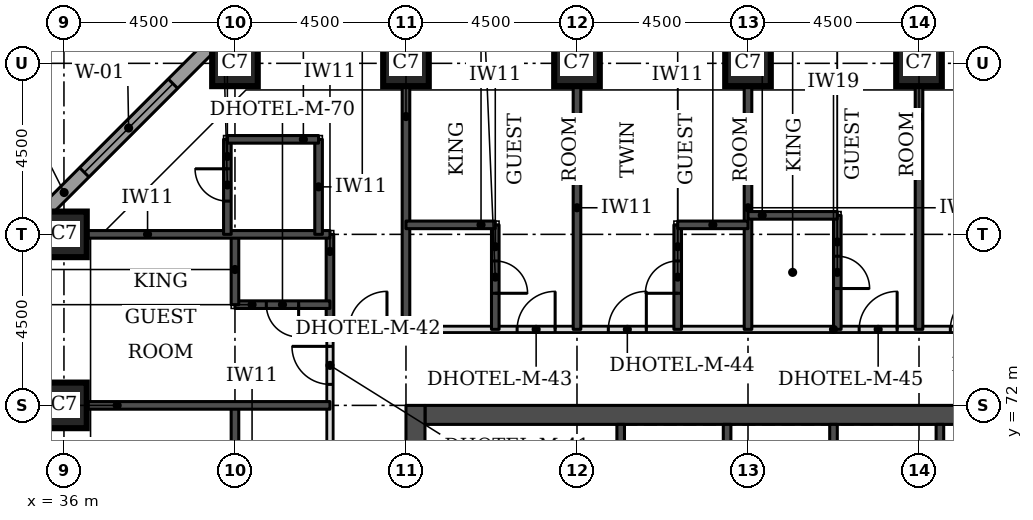
"""IFC4 building model, lengths in metres.
Left out: names, types, materials, properties, quantities, classifications, styles, units other than length and angle.
Written with IfcOpenShell. Run it as: python <this file> out.ifc"""

import sys

from ifc_helpers import new_model, si_unit, direction, frame, frame_2d, origin, origin_2d, place, context, subcontext, project, spatial, rectangle, extrude, element, fill, save


model = new_model("IFC4")
c1 = context("Model", 3, precision=1e-05, world=origin(), true_north=direction((0.0, 1.0)))
c2 = subcontext(c1, "Body", "Model", "MODEL_VIEW")
j1 = project(units=[si_unit("LENGTHUNIT", "METRE"), si_unit("PLANEANGLEUNIT", "RADIAN")], contexts=[c1])
p1 = place(None, origin())
s1 = spatial("IfcSite", under=j1, at=p1, CompositionType="ELEMENT")
p2 = place(p1, origin())
s2 = spatial("IfcBuilding", under=s1, at=p2, CompositionType="ELEMENT")
p3 = place(p2, frame((0.0, 0.0, 23.1)))
s3 = spatial("IfcBuildingStorey", under=s2, at=p3, CompositionType="ELEMENT", Elevation=23.1)
for number, where, z_axis, x_axis in (
    (1, (36.0, 72.0, 0.0), (0.0, 0.0, 1.0), (1.0, 0.0, 0.0)),
    (2, (36.0, 76.5, 0.0), (0.0, 0.0, 1.0), (1.0, 0.0, 0.0)),
    (3, (40.5, 81.0, 0.0), (0.0, 0.0, 1.0), (1.0, 0.0, 0.0)),
    (4, (45.0, 81.0, 0.0), (0.0, 0.0, 1.0), (1.0, 0.0, 0.0)),
    (5, (49.5, 81.0, 0.0), (0.0, 0.0, 1.0), (1.0, 0.0, 0.0)),
    (6, (54.0, 81.0, 0.0), (0.0, 0.0, 1.0), (1.0, 0.0, 0.0)),
    (7, (58.5, 81.0, 0.0), (0.0, 0.0, 1.0), (1.0, 0.0, 0.0)),
):
    element("IfcColumn", number, at=place(p3, frame(where, z_axis=z_axis, x_axis=x_axis)), inside=s3, PredefinedType="COLUMN", context=c2, shape_type="SweptSolid", body=[
        extrude(rectangle(XDim=1.2, YDim=1.2, at=origin_2d()), origin(), (0.0, 0.0, 1.0), 3.3),
    ])
p4 = place(p3, frame((45.5, 71.75, 0.0), z_axis=(0.0, 0.0, 1.0), x_axis=(1.0, 0.0, 0.0)))
e8 = element("IfcWall", 8, at=p4, inside=s3, PredefinedType="SHEAR", context=c2, shape_type="SweptSolid", body=[
    extrude(rectangle(XDim=21.5, YDim=0.5, at=frame_2d((10.75, 0.0))), origin(), (0.0, 0.0, 1.0), 3.3),
])
p5 = place(p3, frame((45.25, 49.5, 0.0), z_axis=(0.0, 0.0, 1.0), x_axis=(0.0, 1.0, 0.0)))
e9 = element("IfcWall", 9, at=p5, inside=s3, PredefinedType="SHEAR", context=c2, shape_type="SweptSolid", body=[
    extrude(rectangle(XDim=22.5, YDim=0.5, at=frame_2d((11.25, 0.0))), origin(), (0.0, 0.0, 1.0), 3.3),
])
p6 = place(p5, frame((4.2, 0.0, 0.0)))
e10 = element("IfcOpeningElement", 10, at=p6, cuts=e9, PredefinedType="OPENING", context=c2, shape_type="SweptSolid", body=[
    extrude(rectangle(XDim=1.8, YDim=2.1, at=frame_2d((0.9, 1.05))), frame((0.0, 0.26, 0.0), z_axis=(0.0, -1.0, 0.0), x_axis=(1.0, 0.0, 0.0)), (0.0, 0.0, 1.0), 0.52),
])
p7 = place(p5, frame((6.9, 0.0, 0.0)))
e11 = element("IfcOpeningElement", 11, at=p7, cuts=e9, PredefinedType="OPENING", context=c2, shape_type="SweptSolid", body=[
    extrude(rectangle(XDim=1.1, YDim=2.1, at=frame_2d((0.55, 1.05))), frame((0.0, 0.26, 0.0), z_axis=(0.0, -1.0, 0.0), x_axis=(1.0, 0.0, 0.0)), (0.0, 0.0, 1.0), 0.52),
])
p8 = place(p5, frame((13.6, 0.0, 0.0)))
e12 = element("IfcOpeningElement", 12, at=p8, cuts=e9, PredefinedType="OPENING", context=c2, shape_type="SweptSolid", body=[
    extrude(rectangle(XDim=1.1, YDim=2.1, at=frame_2d((0.55, 1.05))), frame((0.0, 0.26, 0.0), z_axis=(0.0, -1.0, 0.0), x_axis=(1.0, 0.0, 0.0)), (0.0, 0.0, 1.0), 0.52),
])
p9 = place(p5, frame((16.5, 0.0, 0.0)))
e13 = element("IfcOpeningElement", 13, at=p9, cuts=e9, PredefinedType="OPENING", context=c2, shape_type="SweptSolid", body=[
    extrude(rectangle(XDim=1.8, YDim=2.1, at=frame_2d((0.9, 1.05))), frame((0.0, 0.26, 0.0), z_axis=(0.0, -1.0, 0.0), x_axis=(1.0, 0.0, 0.0)), (0.0, 0.0, 1.0), 0.52),
])
p10 = place(p3, frame((40.23, 81.826, 0.0), z_axis=(0.0, 0.0, 1.0), x_axis=(-0.707106781187, -0.707106781187, 0.0)))
e14 = element("IfcWall", 14, at=p10, inside=s3, PredefinedType="STANDARD", context=c2, shape_type="SweptSolid", body=[
    extrude(rectangle(XDim=7.151, YDim=0.35, at=frame_2d((3.576, 0.0))), origin(), (0.0, 0.0, 1.0), 3.055),
])
p11 = place(p10, frame((1.926, 0.0, 0.8)))
e15 = element("IfcOpeningElement", 15, at=p11, cuts=e14, PredefinedType="OPENING", context=c2, shape_type="SweptSolid", body=[
    extrude(rectangle(XDim=3.3, YDim=1.5, at=frame_2d((1.65, 0.75))), frame((0.0, 0.185, 0.0), z_axis=(0.0, -1.0, 0.0), x_axis=(1.0, 0.0, 0.0)), (0.0, 0.0, 1.0), 0.37),
])
p12 = place(p3, frame((43.0, 56.6, 0.0), z_axis=(0.0, 0.0, 1.0), x_axis=(0.0, 1.0, 0.0)))
e16 = element("IfcWall", 16, at=p12, inside=s3, PredefinedType="PARTITIONING", context=c2, shape_type="SweptSolid", body=[
    extrude(rectangle(XDim=17.4, YDim=0.15, at=frame_2d((8.7, 0.0))), origin(), (0.0, 0.0, 1.0), 3.08),
])
p13 = place(p12, frame((9.075, 0.0, 0.0)))
e17 = element("IfcOpeningElement", 17, at=p13, cuts=e16, PredefinedType="OPENING", context=c2, shape_type="SweptSolid", body=[
    extrude(rectangle(XDim=1.0, YDim=2.1, at=frame_2d((0.5, 1.05))), frame((0.0, 0.085, 0.0), z_axis=(0.0, -1.0, 0.0), x_axis=(1.0, 0.0, 0.0)), (0.0, 0.0, 1.0), 0.17),
])
p14 = place(p12, frame((11.475, 0.0, 0.0)))
e18 = element("IfcOpeningElement", 18, at=p14, cuts=e16, PredefinedType="OPENING", context=c2, shape_type="SweptSolid", body=[
    extrude(rectangle(XDim=1.0, YDim=2.1, at=frame_2d((0.5, 1.05))), frame((0.0, 0.085, 0.0), z_axis=(0.0, -1.0, 0.0), x_axis=(1.0, 0.0, 0.0)), (0.0, 0.0, 1.0), 0.17),
])
p15 = place(p12, frame((15.953, 0.0, 0.0)))
e19 = element("IfcOpeningElement", 19, at=p15, cuts=e16, PredefinedType="OPENING", context=c2, shape_type="SweptSolid", body=[
    extrude(rectangle(XDim=1.0, YDim=2.1, at=frame_2d((0.5, 1.05))), frame((0.0, 0.085, 0.0), z_axis=(0.0, -1.0, 0.0), x_axis=(1.0, 0.0, 0.0)), (0.0, 0.0, 1.0), 0.17),
])
p16 = place(p3, frame((43.0, 74.0, 0.0), z_axis=(0.0, 0.0, 1.0), x_axis=(1.0, 0.0, 0.0)))
e20 = element("IfcWall", 20, at=p16, inside=s3, PredefinedType="PARTITIONING", context=c2, shape_type="SweptSolid", body=[
    extrude(rectangle(XDim=26.5, YDim=0.15, at=frame_2d((13.25, 0.0))), origin(), (0.0, 0.0, 1.0), 3.08),
])
p17 = place(p16, frame((4.925, 0.0, 0.0)))
e21 = element("IfcOpeningElement", 21, at=p17, cuts=e20, PredefinedType="OPENING", context=c2, shape_type="SweptSolid", body=[
    extrude(rectangle(XDim=1.0, YDim=2.1, at=frame_2d((0.5, 1.05))), frame((0.0, 0.085, 0.0), z_axis=(0.0, -1.0, 0.0), x_axis=(1.0, 0.0, 0.0)), (0.0, 0.0, 1.0), 0.17),
])
p18 = place(p16, frame((7.325, 0.0, 0.0)))
e22 = element("IfcOpeningElement", 22, at=p18, cuts=e20, PredefinedType="OPENING", context=c2, shape_type="SweptSolid", body=[
    extrude(rectangle(XDim=1.0, YDim=2.1, at=frame_2d((0.5, 1.05))), frame((0.0, 0.085, 0.0), z_axis=(0.0, -1.0, 0.0), x_axis=(1.0, 0.0, 0.0)), (0.0, 0.0, 1.0), 0.17),
])
p19 = place(p16, frame((13.925, 0.0, 0.0)))
e23 = element("IfcOpeningElement", 23, at=p19, cuts=e20, PredefinedType="OPENING", context=c2, shape_type="SweptSolid", body=[
    extrude(rectangle(XDim=1.0, YDim=2.1, at=frame_2d((0.5, 1.05))), frame((0.0, 0.085, 0.0), z_axis=(0.0, -1.0, 0.0), x_axis=(1.0, 0.0, 0.0)), (0.0, 0.0, 1.0), 0.17),
])
p20 = place(p16, frame((16.325, 0.0, 0.0)))
e24 = element("IfcOpeningElement", 24, at=p20, cuts=e20, PredefinedType="OPENING", context=c2, shape_type="SweptSolid", body=[
    extrude(rectangle(XDim=1.0, YDim=2.1, at=frame_2d((0.5, 1.05))), frame((0.0, 0.085, 0.0), z_axis=(0.0, -1.0, 0.0), x_axis=(1.0, 0.0, 0.0)), (0.0, 0.0, 1.0), 0.17),
])
p21 = place(p16, frame((22.925, 0.0, 0.0)))
e25 = element("IfcOpeningElement", 25, at=p21, cuts=e20, PredefinedType="OPENING", context=c2, shape_type="SweptSolid", body=[
    extrude(rectangle(XDim=1.0, YDim=2.1, at=frame_2d((0.5, 1.05))), frame((0.0, 0.085, 0.0), z_axis=(0.0, -1.0, 0.0), x_axis=(1.0, 0.0, 0.0)), (0.0, 0.0, 1.0), 0.17),
])
p22 = place(p16, frame((0.5, 0.0, 0.0)))
e26 = element("IfcOpeningElement", 26, at=p22, cuts=e20, PredefinedType="OPENING", context=c2, shape_type="SweptSolid", body=[
    extrude(rectangle(XDim=1.0, YDim=2.1, at=frame_2d((0.5, 1.05))), frame((0.0, 0.085, 0.0), z_axis=(0.0, -1.0, 0.0), x_axis=(1.0, 0.0, 0.0)), (0.0, 0.0, 1.0), 0.17),
])
p23 = place(p16, frame((25.0, 0.0, 0.0)))
e27 = element("IfcOpeningElement", 27, at=p23, cuts=e20, PredefinedType="OPENING", context=c2, shape_type="SweptSolid", body=[
    extrude(rectangle(XDim=1.0, YDim=2.1, at=frame_2d((0.5, 1.05))), frame((0.0, 0.085, 0.0), z_axis=(0.0, -1.0, 0.0), x_axis=(1.0, 0.0, 0.0)), (0.0, 0.0, 1.0), 0.17),
])
p24 = place(p3, frame((40.5, 69.65, 0.0), z_axis=(0.0, 0.0, 1.0), x_axis=(0.0, 1.0, 0.0)))
e28 = element("IfcWall", 28, at=p24, inside=s3, PredefinedType="SOLIDWALL", context=c2, shape_type="SweptSolid", body=[
    extrude(rectangle(XDim=2.35, YDim=0.2, at=frame_2d((1.175, 0.0))), origin(), (0.0, 0.0, 1.0), 3.08),
])
p25 = place(p3, frame((36.6, 72.0, 0.0), z_axis=(0.0, 0.0, 1.0), x_axis=(1.0, 0.0, 0.0)))
e29 = element("IfcWall", 29, at=p25, inside=s3, PredefinedType="SOLIDWALL", context=c2, shape_type="SweptSolid", body=[
    extrude(rectangle(XDim=6.4, YDim=0.2, at=frame_2d((3.2, 0.0))), origin(), (0.0, 0.0, 1.0), 3.08),
])
p26 = place(p3, frame((43.0, 74.0, 0.0), z_axis=(0.0, 0.0, 1.0), x_axis=(0.0, 1.0, 0.0)))
e30 = element("IfcWall", 30, at=p26, inside=s3, PredefinedType="SOLIDWALL", context=c2, shape_type="SweptSolid", body=[
    extrude(rectangle(XDim=2.5, YDim=0.2, at=frame_2d((1.25, 0.0))), origin(), (0.0, 0.0, 1.0), 3.08),
])
p27 = place(p3, frame((45.0, 74.0, 0.0), z_axis=(0.0, 0.0, 1.0), x_axis=(0.0, 1.0, 0.0)))
e31 = element("IfcWall", 31, at=p27, inside=s3, PredefinedType="SOLIDWALL", context=c2, shape_type="SweptSolid", body=[
    extrude(rectangle(XDim=6.4, YDim=0.2, at=frame_2d((3.2, 0.0))), origin(), (0.0, 0.0, 1.0), 3.08),
])
p28 = place(p3, frame((47.35, 74.0, 0.0), z_axis=(0.0, 0.0, 1.0), x_axis=(0.0, 1.0, 0.0)))
e32 = element("IfcWall", 32, at=p28, inside=s3, PredefinedType="SOLIDWALL", context=c2, shape_type="SweptSolid", body=[
    extrude(rectangle(XDim=2.75, YDim=0.2, at=frame_2d((1.375, 0.0))), origin(), (0.0, 0.0, 1.0), 3.08),
])
p29 = place(p28, frame((0.95, 0.0, 0.0)))
e33 = element("IfcOpeningElement", 33, at=p29, cuts=e32, PredefinedType="OPENING", context=c2, shape_type="SweptSolid", body=[
    extrude(rectangle(XDim=0.85, YDim=2.1, at=frame_2d((0.425, 1.05))), frame((0.0, 0.11, 0.0), z_axis=(0.0, -1.0, 0.0), x_axis=(1.0, 0.0, 0.0)), (0.0, 0.0, 1.0), 0.22),
])
p30 = place(p3, frame((49.5, 74.0, 0.0), z_axis=(0.0, 0.0, 1.0), x_axis=(0.0, 1.0, 0.0)))
e34 = element("IfcWall", 34, at=p30, inside=s3, PredefinedType="SOLIDWALL", context=c2, shape_type="SweptSolid", body=[
    extrude(rectangle(XDim=6.4, YDim=0.2, at=frame_2d((3.2, 0.0))), origin(), (0.0, 0.0, 1.0), 3.08),
])
p31 = place(p3, frame((52.15, 74.0, 0.0), z_axis=(0.0, 0.0, 1.0), x_axis=(0.0, 1.0, 0.0)))
e35 = element("IfcWall", 35, at=p31, inside=s3, PredefinedType="SOLIDWALL", context=c2, shape_type="SweptSolid", body=[
    extrude(rectangle(XDim=2.75, YDim=0.2, at=frame_2d((1.375, 0.0))), origin(), (0.0, 0.0, 1.0), 3.08),
])
p32 = place(p31, frame((0.95, 0.0, 0.0)))
e36 = element("IfcOpeningElement", 36, at=p32, cuts=e35, PredefinedType="OPENING", context=c2, shape_type="SweptSolid", body=[
    extrude(rectangle(XDim=0.85, YDim=2.1, at=frame_2d((0.425, 1.05))), frame((0.0, 0.11, 0.0), z_axis=(0.0, -1.0, 0.0), x_axis=(1.0, 0.0, 0.0)), (0.0, 0.0, 1.0), 0.22),
])
p33 = place(p3, frame((54.0, 74.0, 0.0), z_axis=(0.0, 0.0, 1.0), x_axis=(0.0, 1.0, 0.0)))
e37 = element("IfcWall", 37, at=p33, inside=s3, PredefinedType="SOLIDWALL", context=c2, shape_type="SweptSolid", body=[
    extrude(rectangle(XDim=6.4, YDim=0.2, at=frame_2d((3.2, 0.0))), origin(), (0.0, 0.0, 1.0), 3.08),
])
p34 = place(p3, frame((56.35, 74.0, 0.0), z_axis=(0.0, 0.0, 1.0), x_axis=(0.0, 1.0, 0.0)))
e38 = element("IfcWall", 38, at=p34, inside=s3, PredefinedType="SOLIDWALL", context=c2, shape_type="SweptSolid", body=[
    extrude(rectangle(XDim=3.0, YDim=0.2, at=frame_2d((1.5, 0.0))), origin(), (0.0, 0.0, 1.0), 3.08),
])
p35 = place(p34, frame((1.075, 0.0, 0.0)))
e39 = element("IfcOpeningElement", 39, at=p35, cuts=e38, PredefinedType="OPENING", context=c2, shape_type="SweptSolid", body=[
    extrude(rectangle(XDim=0.85, YDim=2.1, at=frame_2d((0.425, 1.05))), frame((0.0, 0.11, 0.0), z_axis=(0.0, -1.0, 0.0), x_axis=(1.0, 0.0, 0.0)), (0.0, 0.0, 1.0), 0.22),
])
p36 = place(p3, frame((58.5, 74.0, 0.0), z_axis=(0.0, 0.0, 1.0), x_axis=(0.0, 1.0, 0.0)))
e40 = element("IfcWall", 40, at=p36, inside=s3, PredefinedType="SOLIDWALL", context=c2, shape_type="SweptSolid", body=[
    extrude(rectangle(XDim=6.4, YDim=0.2, at=frame_2d((3.2, 0.0))), origin(), (0.0, 0.0, 1.0), 3.08),
])
p37 = place(p3, frame((40.5, 74.65, 0.0), z_axis=(0.0, 0.0, 1.0), x_axis=(1.0, 0.0, 0.0)))
e41 = element("IfcWall", 41, at=p37, inside=s3, PredefinedType="SOLIDWALL", context=c2, shape_type="SweptSolid", body=[
    extrude(rectangle(XDim=2.5, YDim=0.2, at=frame_2d((1.25, 0.0))), origin(), (0.0, 0.0, 1.0), 3.08),
])
p38 = place(p37, frame((0.825, 0.0, 0.0)))
e42 = element("IfcOpeningElement", 42, at=p38, cuts=e41, PredefinedType="OPENING", context=c2, shape_type="SweptSolid", body=[
    extrude(rectangle(XDim=0.85, YDim=2.1, at=frame_2d((0.425, 1.05))), frame((0.0, 0.11, 0.0), z_axis=(0.0, -1.0, 0.0), x_axis=(1.0, 0.0, 0.0)), (0.0, 0.0, 1.0), 0.22),
])
p39 = place(p3, frame((40.5, 74.65, 0.0), z_axis=(0.0, 0.0, 1.0), x_axis=(0.0, 1.0, 0.0)))
e43 = element("IfcWall", 43, at=p39, inside=s3, PredefinedType="SOLIDWALL", context=c2, shape_type="SweptSolid", body=[
    extrude(rectangle(XDim=1.85, YDim=0.2, at=frame_2d((0.925, 0.0))), origin(), (0.0, 0.0, 1.0), 3.08),
])
p40 = place(p3, frame((36.6, 76.5, 0.0), z_axis=(0.0, 0.0, 1.0), x_axis=(1.0, 0.0, 0.0)))
e44 = element("IfcWall", 44, at=p40, inside=s3, PredefinedType="SOLIDWALL", context=c2, shape_type="SweptSolid", body=[
    extrude(rectangle(XDim=6.4, YDim=0.2, at=frame_2d((3.2, 0.0))), origin(), (0.0, 0.0, 1.0), 3.08),
])
p41 = place(p3, frame((40.3, 76.5, 0.0), z_axis=(0.0, 0.0, 1.0), x_axis=(0.0, 1.0, 0.0)))
e45 = element("IfcWall", 45, at=p41, inside=s3, PredefinedType="SOLIDWALL", context=c2, shape_type="SweptSolid", body=[
    extrude(rectangle(XDim=2.5, YDim=0.2, at=frame_2d((1.25, 0.0))), origin(), (0.0, 0.0, 1.0), 3.08),
])
p42 = place(p41, frame((0.875, 0.0, 0.0)))
e46 = element("IfcOpeningElement", 46, at=p42, cuts=e45, PredefinedType="OPENING", context=c2, shape_type="SweptSolid", body=[
    extrude(rectangle(XDim=0.85, YDim=2.1, at=frame_2d((0.425, 1.05))), frame((0.0, 0.11, 0.0), z_axis=(0.0, -1.0, 0.0), x_axis=(1.0, 0.0, 0.0)), (0.0, 0.0, 1.0), 0.22),
])
p43 = place(p3, frame((42.7, 76.5, 0.0), z_axis=(0.0, 0.0, 1.0), x_axis=(0.0, 1.0, 0.0)))
e47 = element("IfcWall", 47, at=p43, inside=s3, PredefinedType="SOLIDWALL", context=c2, shape_type="SweptSolid", body=[
    extrude(rectangle(XDim=2.5, YDim=0.2, at=frame_2d((1.25, 0.0))), origin(), (0.0, 0.0, 1.0), 3.08),
])
p44 = place(p3, frame((45.0, 76.75, 0.0), z_axis=(0.0, 0.0, 1.0), x_axis=(1.0, 0.0, 0.0)))
e48 = element("IfcWall", 48, at=p44, inside=s3, PredefinedType="SOLIDWALL", context=c2, shape_type="SweptSolid", body=[
    extrude(rectangle(XDim=2.35, YDim=0.2, at=frame_2d((1.175, 0.0))), origin(), (0.0, 0.0, 1.0), 3.08),
])
p45 = place(p3, frame((52.15, 76.75, 0.0), z_axis=(0.0, 0.0, 1.0), x_axis=(1.0, 0.0, 0.0)))
e49 = element("IfcWall", 49, at=p45, inside=s3, PredefinedType="SOLIDWALL", context=c2, shape_type="SweptSolid", body=[
    extrude(rectangle(XDim=1.85, YDim=0.2, at=frame_2d((0.925, 0.0))), origin(), (0.0, 0.0, 1.0), 3.08),
])
p46 = place(p3, frame((54.0, 77.0, 0.0), z_axis=(0.0, 0.0, 1.0), x_axis=(1.0, 0.0, 0.0)))
e50 = element("IfcWall", 50, at=p46, inside=s3, PredefinedType="SOLIDWALL", context=c2, shape_type="SweptSolid", body=[
    extrude(rectangle(XDim=2.35, YDim=0.2, at=frame_2d((1.175, 0.0))), origin(), (0.0, 0.0, 1.0), 3.08),
])
p47 = place(p3, frame((40.3, 79.0, 0.0), z_axis=(0.0, 0.0, 1.0), x_axis=(1.0, 0.0, 0.0)))
e51 = element("IfcWall", 51, at=p47, inside=s3, PredefinedType="SOLIDWALL", context=c2, shape_type="SweptSolid", body=[
    extrude(rectangle(XDim=2.4, YDim=0.2, at=frame_2d((1.2, 0.0))), origin(), (0.0, 0.0, 1.0), 3.08),
])
for number, where, z_axis, x_axis in (
    (52, (50.65, 68.5, 0.0), (0.0, 0.0, 1.0), (0.0, 1.0, 0.0)),
    (53, (53.45, 68.5, 0.0), (0.0, 0.0, 1.0), (0.0, 1.0, 0.0)),
    (54, (56.25, 68.5, 0.0), (0.0, 0.0, 1.0), (0.0, 1.0, 0.0)),
    (55, (59.05, 68.5, 0.0), (0.0, 0.0, 1.0), (0.0, 1.0, 0.0)),
):
    element("IfcWall", number, at=place(p3, frame(where, z_axis=z_axis, x_axis=x_axis)), inside=s3, PredefinedType="SOLIDWALL", context=c2, shape_type="SweptSolid", body=[
        extrude(rectangle(XDim=3.0, YDim=0.2, at=frame_2d((1.5, 0.0))), origin(), (0.0, 0.0, 1.0), 3.08),
    ])
p48 = place(p11, origin())
e56 = element("IfcWindow", 56, at=p48, inside=s3, PartitioningType="SINGLE_PANEL", PredefinedType="WINDOW", context=c2, shape_type="SweptSolid", body=[
    extrude(rectangle(XDim=3.3, YDim=1.5, at=frame_2d((1.65, 0.75))), frame((0.0, 0.085, 0.0), z_axis=(0.0, -1.0, 0.0), x_axis=(1.0, 0.0, 0.0)), (0.0, 0.0, 1.0), 0.06),
])
fill(e15, e56)
p49 = place(p15, origin())
e57 = element("IfcDoor", 57, at=p49, inside=s3, OperationType="SINGLE_SWING_RIGHT", PredefinedType="DOOR", context=c2, shape_type="SweptSolid", body=[
    extrude(rectangle(XDim=1.0, YDim=2.1, at=frame_2d((0.5, 1.05))), frame((0.0, 0.025, 0.0), z_axis=(0.0, -1.0, 0.0), x_axis=(1.0, 0.0, 0.0)), (0.0, 0.0, 1.0), 0.05),
])
fill(e19, e57)
p50 = place(p38, frame((0.85, 0.0, 0.0), z_axis=(0.0, 0.0, 1.0), x_axis=(-1.0, 0.0, 0.0)))
e58 = element("IfcDoor", 58, at=p50, inside=s3, OperationType="SINGLE_SWING_LEFT", PredefinedType="DOOR", context=c2, shape_type="SweptSolid", body=[
    extrude(rectangle(XDim=0.85, YDim=2.1, at=frame_2d((0.425, 1.05))), frame((0.0, 0.025, 0.0), z_axis=(0.0, -1.0, 0.0), x_axis=(1.0, 0.0, 0.0)), (0.0, 0.0, 1.0), 0.05),
])
fill(e42, e58)
p51 = place(p17, origin())
e59 = element("IfcDoor", 59, at=p51, inside=s3, OperationType="SINGLE_SWING_RIGHT", PredefinedType="DOOR", context=c2, shape_type="SweptSolid", body=[
    extrude(rectangle(XDim=1.0, YDim=2.1, at=frame_2d((0.5, 1.05))), frame((0.0, 0.025, 0.0), z_axis=(0.0, -1.0, 0.0), x_axis=(1.0, 0.0, 0.0)), (0.0, 0.0, 1.0), 0.05),
])
fill(e21, e59)
p52 = place(p29, frame((0.85, 0.0, 0.0), z_axis=(0.0, 0.0, 1.0), x_axis=(-1.0, 0.0, 0.0)))
e60 = element("IfcDoor", 60, at=p52, inside=s3, OperationType="SINGLE_SWING_RIGHT", PredefinedType="DOOR", context=c2, shape_type="SweptSolid", body=[
    extrude(rectangle(XDim=0.85, YDim=2.1, at=frame_2d((0.425, 1.05))), frame((0.0, 0.025, 0.0), z_axis=(0.0, -1.0, 0.0), x_axis=(1.0, 0.0, 0.0)), (0.0, 0.0, 1.0), 0.05),
])
fill(e33, e60)
p53 = place(p18, origin())
e61 = element("IfcDoor", 61, at=p53, inside=s3, OperationType="SINGLE_SWING_RIGHT", PredefinedType="DOOR", context=c2, shape_type="SweptSolid", body=[
    extrude(rectangle(XDim=1.0, YDim=2.1, at=frame_2d((0.5, 1.05))), frame((0.0, 0.025, 0.0), z_axis=(0.0, -1.0, 0.0), x_axis=(1.0, 0.0, 0.0)), (0.0, 0.0, 1.0), 0.05),
])
fill(e22, e61)
p54 = place(p32, origin())
e62 = element("IfcDoor", 62, at=p54, inside=s3, OperationType="SINGLE_SWING_LEFT", PredefinedType="DOOR", context=c2, shape_type="SweptSolid", body=[
    extrude(rectangle(XDim=0.85, YDim=2.1, at=frame_2d((0.425, 1.05))), frame((0.0, 0.025, 0.0), z_axis=(0.0, -1.0, 0.0), x_axis=(1.0, 0.0, 0.0)), (0.0, 0.0, 1.0), 0.05),
])
fill(e36, e62)
p55 = place(p19, origin())
e63 = element("IfcDoor", 63, at=p55, inside=s3, OperationType="SINGLE_SWING_RIGHT", PredefinedType="DOOR", context=c2, shape_type="SweptSolid", body=[
    extrude(rectangle(XDim=1.0, YDim=2.1, at=frame_2d((0.5, 1.05))), frame((0.0, 0.025, 0.0), z_axis=(0.0, -1.0, 0.0), x_axis=(1.0, 0.0, 0.0)), (0.0, 0.0, 1.0), 0.05),
])
fill(e23, e63)
p56 = place(p35, frame((0.85, 0.0, 0.0), z_axis=(0.0, 0.0, 1.0), x_axis=(-1.0, 0.0, 0.0)))
e64 = element("IfcDoor", 64, at=p56, inside=s3, OperationType="SINGLE_SWING_RIGHT", PredefinedType="DOOR", context=c2, shape_type="SweptSolid", body=[
    extrude(rectangle(XDim=0.85, YDim=2.1, at=frame_2d((0.425, 1.05))), frame((0.0, 0.025, 0.0), z_axis=(0.0, -1.0, 0.0), x_axis=(1.0, 0.0, 0.0)), (0.0, 0.0, 1.0), 0.05),
])
fill(e39, e64)
p57 = place(p20, origin())
e65 = element("IfcDoor", 65, at=p57, inside=s3, OperationType="SINGLE_SWING_RIGHT", PredefinedType="DOOR", context=c2, shape_type="SweptSolid", body=[
    extrude(rectangle(XDim=1.0, YDim=2.1, at=frame_2d((0.5, 1.05))), frame((0.0, 0.025, 0.0), z_axis=(0.0, -1.0, 0.0), x_axis=(1.0, 0.0, 0.0)), (0.0, 0.0, 1.0), 0.05),
])
fill(e24, e65)
p58 = place(p22, origin())
e66 = element("IfcDoor", 66, at=p58, inside=s3, OperationType="SINGLE_SWING_RIGHT", PredefinedType="DOOR", context=c2, shape_type="SweptSolid", body=[
    extrude(rectangle(XDim=1.0, YDim=2.1, at=frame_2d((0.5, 1.05))), frame((0.0, 0.025, 0.0), z_axis=(0.0, -1.0, 0.0), x_axis=(1.0, 0.0, 0.0)), (0.0, 0.0, 1.0), 0.05),
])
fill(e26, e66)
p59 = place(p42, origin())
e67 = element("IfcDoor", 67, at=p59, inside=s3, OperationType="SINGLE_SWING_RIGHT", PredefinedType="DOOR", context=c2, shape_type="SweptSolid", body=[
    extrude(rectangle(XDim=0.85, YDim=2.1, at=frame_2d((0.425, 1.05))), frame((0.0, 0.025, 0.0), z_axis=(0.0, -1.0, 0.0), x_axis=(1.0, 0.0, 0.0)), (0.0, 0.0, 1.0), 0.05),
])
fill(e46, e67)
save(model, sys.argv[1])
